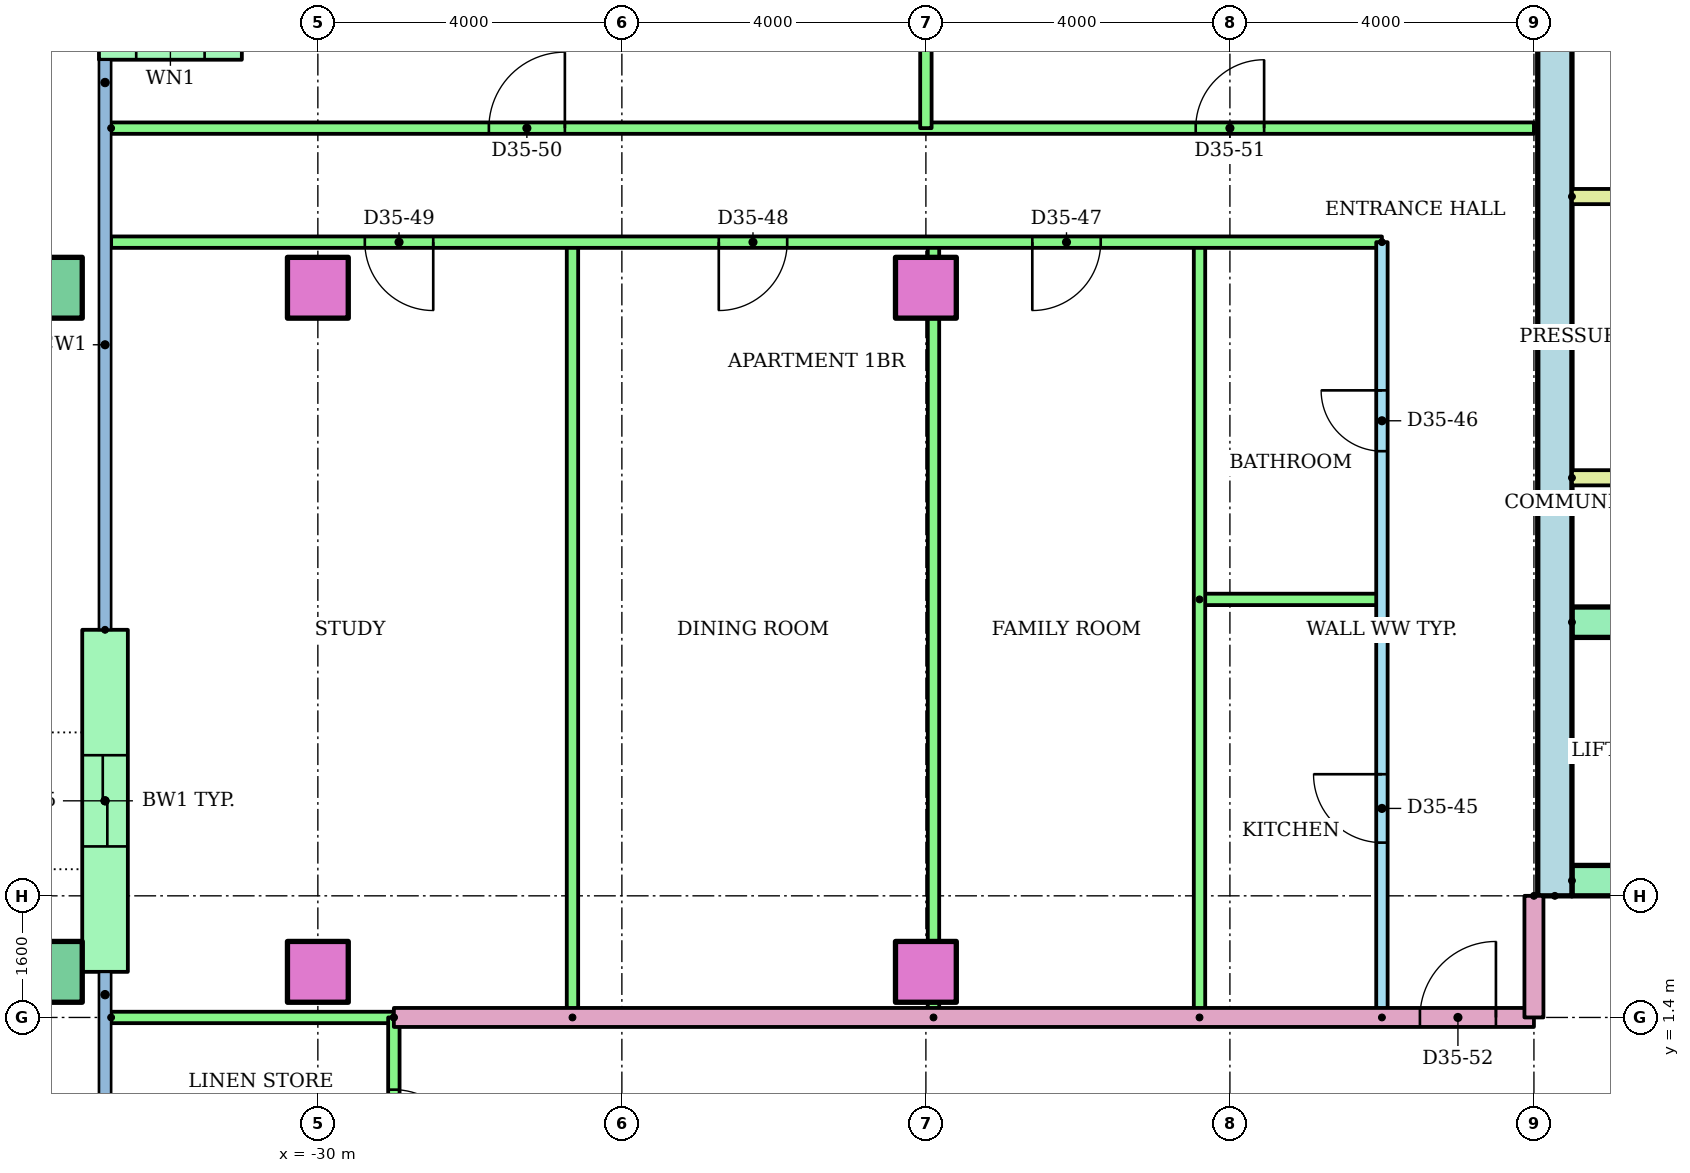
"""IFC4 building model, lengths in metres.
Left out: names, types, materials, properties, quantities, classifications, styles, units other than length and angle.
Written with IfcOpenShell. Run it as: python <this file> out.ifc"""

import sys

from ifc_helpers import new_model, si_unit, direction, frame, frame_2d, origin, origin_2d, place, context, subcontext, project, spatial, rectangle, hollow_rectangle, extrude, element, fill, save


model = new_model("IFC4")
c1 = context("Model", 3, precision=1e-05, world=origin(), true_north=direction((0.0, 1.0)))
c2 = subcontext(c1, "Body", "Model", "MODEL_VIEW")
j1 = project(units=[si_unit("LENGTHUNIT", "METRE"), si_unit("PLANEANGLEUNIT", "RADIAN")], contexts=[c1])
p1 = place(None, origin())
s1 = spatial("IfcSite", under=j1, at=p1, CompositionType="ELEMENT")
p2 = place(p1, origin())
s2 = spatial("IfcBuilding", under=s1, at=p2, CompositionType="ELEMENT")
p3 = place(p2, frame((0.0, 0.0, 135.8)))
s3 = spatial("IfcBuildingStorey", under=s2, at=p3, CompositionType="ELEMENT", Elevation=135.8)
p4 = place(p3, frame((-33.5, 2.0, 0.0)))
e1 = element("IfcColumn", 1, at=p4, inside=s3, PredefinedType="COLUMN", context=c2, shape_type="SweptSolid", body=[
    extrude(hollow_rectangle(XDim=0.8, YDim=0.8, WallThickness=0.04, at=origin_2d()), origin(), (0.0, 0.0, 1.0), 3.2),
])
for number, where in (
    (2, (-30.0, 2.0, 0.0)),
    (3, (-22.0, 2.0, 0.0)),
):
    element("IfcColumn", number, at=place(p3, frame(where)), inside=s3, PredefinedType="COLUMN", context=c2, shape_type="SweptSolid", body=[
        extrude(rectangle(XDim=0.8, YDim=0.8, at=origin_2d()), origin(), (0.0, 0.0, 1.0), 3.2),
    ])
p5 = place(p3, frame((-33.5, 11.0, 0.0)))
e4 = element("IfcColumn", 4, at=p5, inside=s3, PredefinedType="COLUMN", context=c2, shape_type="SweptSolid", body=[
    extrude(hollow_rectangle(XDim=0.8, YDim=0.8, WallThickness=0.04, at=origin_2d()), origin(), (0.0, 0.0, 1.0), 3.2),
])
for number, where in (
    (5, (-30.0, 11.0, 0.0)),
    (6, (-22.0, 11.0, 0.0)),
):
    element("IfcColumn", number, at=place(p3, frame(where)), inside=s3, PredefinedType="COLUMN", context=c2, shape_type="SweptSolid", body=[
        extrude(rectangle(XDim=0.8, YDim=0.8, at=origin_2d()), origin(), (0.0, 0.0, 1.0), 3.2),
    ])
p6 = place(p3, frame((-31.0, 14.3, 0.0), z_axis=(0.0, 0.0, 1.0), x_axis=(-1.0, 0.0, 0.0)))
e7 = element("IfcWall", 7, at=p6, inside=s3, PredefinedType="STANDARD", context=c2, shape_type="SweptSolid", body=[
    extrude(rectangle(XDim=1.88, YDim=0.6, at=frame_2d((0.94, 0.0))), origin(), (0.0, 0.0, 1.0), 2.92),
])
p7 = place(p6, frame((0.49, 0.0, 0.9)))
e8 = element("IfcOpeningElement", 8, at=p7, cuts=e7, PredefinedType="OPENING", context=c2, shape_type="SweptSolid", body=[
    extrude(rectangle(XDim=0.9, YDim=1.5, at=frame_2d((0.45, 0.75))), frame((0.0, 0.31, 0.0), z_axis=(0.0, -1.0, 0.0), x_axis=(1.0, 0.0, 0.0)), (0.0, 0.0, 1.0), 0.62),
])
p8 = place(p3, frame((-32.8, 6.5, 0.0), z_axis=(0.0, 0.0, 1.0), x_axis=(0.0, -1.0, 0.0)))
e9 = element("IfcWall", 9, at=p8, inside=s3, PredefinedType="STANDARD", context=c2, shape_type="SweptSolid", body=[
    extrude(rectangle(XDim=4.5, YDim=0.6, at=frame_2d((2.25, 0.0))), origin(), (0.0, 0.0, 1.0), 2.92),
])
p9 = place(p8, frame((1.65, 0.0, 0.0)))
e10 = element("IfcOpeningElement", 10, at=p9, cuts=e9, PredefinedType="OPENING", context=c2, shape_type="SweptSolid", body=[
    extrude(rectangle(XDim=1.2, YDim=2.1, at=frame_2d((0.6, 1.05))), frame((0.0, 0.31, 0.0), z_axis=(0.0, -1.0, 0.0), x_axis=(1.0, 0.0, 0.0)), (0.0, 0.0, 1.0), 0.62),
])
p10 = place(p3, frame((-13.725, 3.0, 0.0), z_axis=(0.0, 0.0, 1.0), x_axis=(0.0, 1.0, 0.0)))
e11 = element("IfcWall", 11, at=p10, inside=s3, PredefinedType="SHEAR", context=c2, shape_type="SweptSolid", body=[
    extrude(rectangle(XDim=17.0, YDim=0.45, at=frame_2d((8.5, 0.0))), origin(), (0.0, 0.0, 1.0), 2.92),
])
p11 = place(p3, frame((-13.5, 3.2, 0.0)))
e12 = element("IfcWall", 12, at=p11, inside=s3, PredefinedType="SHEAR", context=c2, shape_type="SweptSolid", body=[
    extrude(rectangle(XDim=27.0, YDim=0.4, at=frame_2d((13.5, 0.0))), origin(), (0.0, 0.0, 1.0), 2.92),
])
p12 = place(p11, frame((6.861, 0.0, 0.0)))
e13 = element("IfcOpeningElement", 13, at=p12, cuts=e12, PredefinedType="OPENING", context=c2, shape_type="SweptSolid", body=[
    extrude(rectangle(XDim=1.1, YDim=2.1, at=frame_2d((0.55, 1.05))), frame((0.0, 0.21, 0.0), z_axis=(0.0, -1.0, 0.0), x_axis=(1.0, 0.0, 0.0)), (0.0, 0.0, 1.0), 0.42),
])
p13 = place(p11, frame((9.906, 0.0, 0.0)))
e14 = element("IfcOpeningElement", 14, at=p13, cuts=e12, PredefinedType="OPENING", context=c2, shape_type="SweptSolid", body=[
    extrude(rectangle(XDim=1.1, YDim=2.1, at=frame_2d((0.55, 1.05))), frame((0.0, 0.21, 0.0), z_axis=(0.0, -1.0, 0.0), x_axis=(1.0, 0.0, 0.0)), (0.0, 0.0, 1.0), 0.42),
])
p14 = place(p11, frame((15.994, 0.0, 0.0)))
e15 = element("IfcOpeningElement", 15, at=p14, cuts=e12, PredefinedType="OPENING", context=c2, shape_type="SweptSolid", body=[
    extrude(rectangle(XDim=1.1, YDim=2.1, at=frame_2d((0.55, 1.05))), frame((0.0, 0.21, 0.0), z_axis=(0.0, -1.0, 0.0), x_axis=(1.0, 0.0, 0.0)), (0.0, 0.0, 1.0), 0.42),
])
p15 = place(p11, frame((19.039, 0.0, 0.0)))
e16 = element("IfcOpeningElement", 16, at=p15, cuts=e12, PredefinedType="OPENING", context=c2, shape_type="SweptSolid", body=[
    extrude(rectangle(XDim=1.1, YDim=2.1, at=frame_2d((0.55, 1.05))), frame((0.0, 0.21, 0.0), z_axis=(0.0, -1.0, 0.0), x_axis=(1.0, 0.0, 0.0)), (0.0, 0.0, 1.0), 0.42),
])
p16 = place(p11, frame((12.6, 0.0, 0.0)))
e17 = element("IfcOpeningElement", 17, at=p16, cuts=e12, PredefinedType="OPENING", context=c2, shape_type="SweptSolid", body=[
    extrude(rectangle(XDim=1.8, YDim=2.1, at=frame_2d((0.9, 1.05))), frame((0.0, 0.21, 0.0), z_axis=(0.0, -1.0, 0.0), x_axis=(1.0, 0.0, 0.0)), (0.0, 0.0, 1.0), 0.42),
])
p17 = place(p3, frame((-13.5, 6.6, 0.0)))
e18 = element("IfcWall", 18, at=p17, inside=s3, PredefinedType="SHEAR", context=c2, shape_type="SweptSolid", body=[
    extrude(rectangle(XDim=11.978, YDim=0.4, at=frame_2d((5.989, 0.0))), origin(), (0.0, 0.0, 1.0), 2.92),
])
for number, where in (
    (19, (-13.5, 8.5, 0.0)),
    (20, (-13.5, 12.2, 0.0)),
):
    element("IfcWall", number, at=place(p3, frame(where)), inside=s3, PredefinedType="PARTITIONING", context=c2, shape_type="SweptSolid", body=[
        extrude(rectangle(XDim=3.9, YDim=0.2, at=frame_2d((1.95, 0.0))), origin(), (0.0, 0.0, 1.0), 2.92),
    ])
p18 = place(p3, frame((-16.0, 1.4, 0.0), z_axis=(0.0, 0.0, 1.0), x_axis=(0.0, 1.0, 0.0)))
e21 = element("IfcWall", 21, at=p18, inside=s3, PredefinedType="PARTITIONING", context=c2, shape_type="SweptSolid", body=[
    extrude(rectangle(XDim=10.2, YDim=0.15, at=frame_2d((5.1, 0.0))), origin(), (0.0, 0.0, 1.0), 2.4),
])
p19 = place(p18, frame((2.3, 0.0, 0.0)))
e22 = element("IfcOpeningElement", 22, at=p19, cuts=e21, PredefinedType="OPENING", context=c2, shape_type="SweptSolid", body=[
    extrude(rectangle(XDim=0.9, YDim=2.1, at=frame_2d((0.45, 1.05))), frame((0.0, 0.085, 0.0), z_axis=(0.0, -1.0, 0.0), x_axis=(1.0, 0.0, 0.0)), (0.0, 0.0, 1.0), 0.17),
])
p20 = place(p18, frame((7.45, 0.0, 0.0)))
e23 = element("IfcOpeningElement", 23, at=p20, cuts=e21, PredefinedType="OPENING", context=c2, shape_type="SweptSolid", body=[
    extrude(rectangle(XDim=0.8, YDim=2.1, at=frame_2d((0.4, 1.05))), frame((0.0, 0.085, 0.0), z_axis=(0.0, -1.0, 0.0), x_axis=(1.0, 0.0, 0.0)), (0.0, 0.0, 1.0), 0.17),
])
p21 = place(p3, frame((-18.4, 6.9, 0.0)))
e24 = element("IfcWall", 24, at=p21, inside=s3, PredefinedType="PARTITIONING", context=c2, shape_type="SweptSolid", body=[
    extrude(rectangle(XDim=2.4, YDim=0.15, at=frame_2d((1.2, 0.0))), origin(), (0.0, 0.0, 1.0), 2.4),
])
for number, where, z_axis, x_axis in (
    (25, (-18.4, 1.4, 0.0), (0.0, 0.0, 1.0), (0.0, 1.0, 0.0)),
    (26, (-21.9, 1.4, 0.0), (0.0, 0.0, 1.0), (0.0, 1.0, 0.0)),
    (27, (-26.65, 1.4, 0.0), (0.0, 0.0, 1.0), (0.0, 1.0, 0.0)),
):
    element("IfcWall", number, at=place(p3, frame(where, z_axis=z_axis, x_axis=x_axis)), inside=s3, PredefinedType="PARTITIONING", context=c2, shape_type="SweptSolid", body=[
        extrude(rectangle(XDim=10.2, YDim=0.15, at=frame_2d((5.1, 0.0))), origin(), (0.0, 0.0, 1.0), 2.4),
    ])
p22 = place(p3, frame((-16.0, 11.6, 0.0), z_axis=(0.0, 0.0, 1.0), x_axis=(-1.0, 0.0, 0.0)))
e28 = element("IfcWall", 28, at=p22, inside=s3, PredefinedType="PARTITIONING", context=c2, shape_type="SweptSolid", body=[
    extrude(rectangle(XDim=16.72, YDim=0.15, at=frame_2d((8.36, 0.0))), origin(), (0.0, 0.0, 1.0), 2.4),
])
p23 = place(p22, frame((3.7, 0.0, 0.0)))
e29 = element("IfcOpeningElement", 29, at=p23, cuts=e28, PredefinedType="OPENING", context=c2, shape_type="SweptSolid", body=[
    extrude(rectangle(XDim=0.9, YDim=2.1, at=frame_2d((0.45, 1.05))), frame((0.0, 0.085, 0.0), z_axis=(0.0, -1.0, 0.0), x_axis=(1.0, 0.0, 0.0)), (0.0, 0.0, 1.0), 0.17),
])
p24 = place(p22, frame((7.825, 0.0, 0.0)))
e30 = element("IfcOpeningElement", 30, at=p24, cuts=e28, PredefinedType="OPENING", context=c2, shape_type="SweptSolid", body=[
    extrude(rectangle(XDim=0.9, YDim=2.1, at=frame_2d((0.45, 1.05))), frame((0.0, 0.085, 0.0), z_axis=(0.0, -1.0, 0.0), x_axis=(1.0, 0.0, 0.0)), (0.0, 0.0, 1.0), 0.17),
])
p25 = place(p22, frame((12.482, 0.0, 0.0)))
e31 = element("IfcOpeningElement", 31, at=p25, cuts=e28, PredefinedType="OPENING", context=c2, shape_type="SweptSolid", body=[
    extrude(rectangle(XDim=0.9, YDim=2.1, at=frame_2d((0.45, 1.05))), frame((0.0, 0.085, 0.0), z_axis=(0.0, -1.0, 0.0), x_axis=(1.0, 0.0, 0.0)), (0.0, 0.0, 1.0), 0.17),
])
p26 = place(p3, frame((-32.72, 13.1, 0.0)))
e32 = element("IfcWall", 32, at=p26, inside=s3, PredefinedType="PARTITIONING", context=c2, shape_type="SweptSolid", body=[
    extrude(rectangle(XDim=18.72, YDim=0.15, at=frame_2d((9.36, 0.0))), origin(), (0.0, 0.0, 1.0), 2.4),
])
p27 = place(p26, frame((4.97, 0.0, 0.0)))
e33 = element("IfcOpeningElement", 33, at=p27, cuts=e32, PredefinedType="OPENING", context=c2, shape_type="SweptSolid", body=[
    extrude(rectangle(XDim=1.0, YDim=2.1, at=frame_2d((0.5, 1.05))), frame((0.0, 0.085, 0.0), z_axis=(0.0, -1.0, 0.0), x_axis=(1.0, 0.0, 0.0)), (0.0, 0.0, 1.0), 0.17),
])
p28 = place(p26, frame((14.27, 0.0, 0.0)))
e34 = element("IfcOpeningElement", 34, at=p28, cuts=e32, PredefinedType="OPENING", context=c2, shape_type="SweptSolid", body=[
    extrude(rectangle(XDim=0.9, YDim=2.1, at=frame_2d((0.45, 1.05))), frame((0.0, 0.085, 0.0), z_axis=(0.0, -1.0, 0.0), x_axis=(1.0, 0.0, 0.0)), (0.0, 0.0, 1.0), 0.17),
])
p29 = place(p3, frame((-22.0, 18.721, 0.0), z_axis=(0.0, 0.0, 1.0), x_axis=(0.0, -1.0, 0.0)))
e35 = element("IfcWall", 35, at=p29, inside=s3, PredefinedType="PARTITIONING", context=c2, shape_type="SweptSolid", body=[
    extrude(rectangle(XDim=5.621, YDim=0.15, at=frame_2d((2.811, 0.0))), origin(), (0.0, 0.0, 1.0), 2.4),
])
p30 = place(p3, frame((-29.0, 1.4, 0.0)))
e36 = element("IfcWall", 36, at=p30, inside=s3, PredefinedType="PARTITIONING", context=c2, shape_type="SweptSolid", body=[
    extrude(rectangle(XDim=15.0, YDim=0.25, at=frame_2d((7.5, 0.0))), origin(), (0.0, 0.0, 1.0), 2.4),
])
p31 = place(p30, frame((13.5, 0.0, 0.0)))
e37 = element("IfcOpeningElement", 37, at=p31, cuts=e36, PredefinedType="OPENING", context=c2, shape_type="SweptSolid", body=[
    extrude(rectangle(XDim=1.0, YDim=2.1, at=frame_2d((0.5, 1.05))), frame((0.0, 0.135, 0.0), z_axis=(0.0, -1.0, 0.0), x_axis=(1.0, 0.0, 0.0)), (0.0, 0.0, 1.0), 0.27),
])
p32 = place(p3, frame((-32.72, 1.4, 0.0)))
e38 = element("IfcWall", 38, at=p32, inside=s3, PredefinedType="PARTITIONING", context=c2, shape_type="SweptSolid", body=[
    extrude(rectangle(XDim=3.72, YDim=0.15, at=frame_2d((1.86, 0.0))), origin(), (0.0, 0.0, 1.0), 2.4),
])
p33 = place(p3, frame((-29.0, 1.4, 0.0), z_axis=(0.0, 0.0, 1.0), x_axis=(0.0, -1.0, 0.0)))
e39 = element("IfcWall", 39, at=p33, inside=s3, PredefinedType="PARTITIONING", context=c2, shape_type="SweptSolid", body=[
    extrude(rectangle(XDim=2.8, YDim=0.15, at=frame_2d((1.4, 0.0))), origin(), (0.0, 0.0, 1.0), 2.4),
])
p34 = place(p33, frame((0.95, 0.0, 0.0)))
e40 = element("IfcOpeningElement", 40, at=p34, cuts=e39, PredefinedType="OPENING", context=c2, shape_type="SweptSolid", body=[
    extrude(rectangle(XDim=0.9, YDim=2.1, at=frame_2d((0.45, 1.05))), frame((0.0, 0.085, 0.0), z_axis=(0.0, -1.0, 0.0), x_axis=(1.0, 0.0, 0.0)), (0.0, 0.0, 1.0), 0.17),
])
p35 = place(p3, frame((-14.0, 3.0, 0.0), z_axis=(0.0, 0.0, 1.0), x_axis=(0.0, -1.0, 0.0)))
e41 = element("IfcWall", 41, at=p35, inside=s3, PredefinedType="PARTITIONING", context=c2, shape_type="SweptSolid", body=[
    extrude(rectangle(XDim=1.6, YDim=0.25, at=frame_2d((0.8, 0.0))), origin(), (0.0, 0.0, 1.0), 2.4),
])
p36 = place(p19, origin())
e42 = element("IfcDoor", 42, at=p36, inside=s3, OperationType="SINGLE_SWING_RIGHT", PredefinedType="DOOR", context=c2, shape_type="SweptSolid", body=[
    extrude(rectangle(XDim=0.9, YDim=2.1, at=frame_2d((0.45, 1.05))), frame((0.0, 0.025, 0.0), z_axis=(0.0, -1.0, 0.0), x_axis=(1.0, 0.0, 0.0)), (0.0, 0.0, 1.0), 0.05),
])
fill(e22, e42)
p37 = place(p20, origin())
e43 = element("IfcDoor", 43, at=p37, inside=s3, OperationType="SINGLE_SWING_RIGHT", PredefinedType="DOOR", context=c2, shape_type="SweptSolid", body=[
    extrude(rectangle(XDim=0.8, YDim=2.1, at=frame_2d((0.4, 1.05))), frame((0.0, 0.025, 0.0), z_axis=(0.0, -1.0, 0.0), x_axis=(1.0, 0.0, 0.0)), (0.0, 0.0, 1.0), 0.05),
])
fill(e23, e43)
p38 = place(p23, origin())
e44 = element("IfcDoor", 44, at=p38, inside=s3, OperationType="SINGLE_SWING_RIGHT", PredefinedType="DOOR", context=c2, shape_type="SweptSolid", body=[
    extrude(rectangle(XDim=0.9, YDim=2.1, at=frame_2d((0.45, 1.05))), frame((0.0, 0.025, 0.0), z_axis=(0.0, -1.0, 0.0), x_axis=(1.0, 0.0, 0.0)), (0.0, 0.0, 1.0), 0.05),
])
fill(e29, e44)
p39 = place(p24, origin())
e45 = element("IfcDoor", 45, at=p39, inside=s3, OperationType="SINGLE_SWING_RIGHT", PredefinedType="DOOR", context=c2, shape_type="SweptSolid", body=[
    extrude(rectangle(XDim=0.9, YDim=2.1, at=frame_2d((0.45, 1.05))), frame((0.0, 0.025, 0.0), z_axis=(0.0, -1.0, 0.0), x_axis=(1.0, 0.0, 0.0)), (0.0, 0.0, 1.0), 0.05),
])
fill(e30, e45)
p40 = place(p25, origin())
e46 = element("IfcDoor", 46, at=p40, inside=s3, OperationType="SINGLE_SWING_LEFT", PredefinedType="DOOR", context=c2, shape_type="SweptSolid", body=[
    extrude(rectangle(XDim=0.9, YDim=2.1, at=frame_2d((0.45, 1.05))), frame((0.0, 0.025, 0.0), z_axis=(0.0, -1.0, 0.0), x_axis=(1.0, 0.0, 0.0)), (0.0, 0.0, 1.0), 0.05),
])
fill(e31, e46)
p41 = place(p27, origin())
e47 = element("IfcDoor", 47, at=p41, inside=s3, OperationType="SINGLE_SWING_RIGHT", PredefinedType="DOOR", context=c2, shape_type="SweptSolid", body=[
    extrude(rectangle(XDim=1.0, YDim=2.1, at=frame_2d((0.5, 1.05))), frame((0.0, 0.025, 0.0), z_axis=(0.0, -1.0, 0.0), x_axis=(1.0, 0.0, 0.0)), (0.0, 0.0, 1.0), 0.05),
])
fill(e33, e47)
p42 = place(p28, origin())
e48 = element("IfcDoor", 48, at=p42, inside=s3, OperationType="SINGLE_SWING_RIGHT", PredefinedType="DOOR", context=c2, shape_type="SweptSolid", body=[
    extrude(rectangle(XDim=0.9, YDim=2.1, at=frame_2d((0.45, 1.05))), frame((0.0, 0.025, 0.0), z_axis=(0.0, -1.0, 0.0), x_axis=(1.0, 0.0, 0.0)), (0.0, 0.0, 1.0), 0.05),
])
fill(e34, e48)
p43 = place(p31, origin())
e49 = element("IfcDoor", 49, at=p43, inside=s3, OperationType="SINGLE_SWING_RIGHT", PredefinedType="DOOR", context=c2, shape_type="SweptSolid", body=[
    extrude(rectangle(XDim=1.0, YDim=2.1, at=frame_2d((0.5, 1.05))), frame((0.0, 0.025, 0.0), z_axis=(0.0, -1.0, 0.0), x_axis=(1.0, 0.0, 0.0)), (0.0, 0.0, 1.0), 0.05),
])
fill(e37, e49)
p44 = place(p34, origin())
e50 = element("IfcDoor", 50, at=p44, inside=s3, OperationType="SINGLE_SWING_RIGHT", PredefinedType="DOOR", context=c2, shape_type="SweptSolid", body=[
    extrude(rectangle(XDim=0.9, YDim=2.1, at=frame_2d((0.45, 1.05))), frame((0.0, 0.025, 0.0), z_axis=(0.0, -1.0, 0.0), x_axis=(1.0, 0.0, 0.0)), (0.0, 0.0, 1.0), 0.05),
])
fill(e40, e50)
p45 = place(p9, origin())
e51 = element("IfcDoor", 51, at=p45, inside=s3, OperationType="SLIDING_TO_LEFT", PredefinedType="DOOR", context=c2, shape_type="SweptSolid", body=[
    extrude(rectangle(XDim=1.2, YDim=2.1, at=frame_2d((0.6, 1.05))), frame((0.0, 0.025, 0.0), z_axis=(0.0, -1.0, 0.0), x_axis=(1.0, 0.0, 0.0)), (0.0, 0.0, 1.0), 0.05),
])
fill(e10, e51)
save(model, sys.argv[1])
